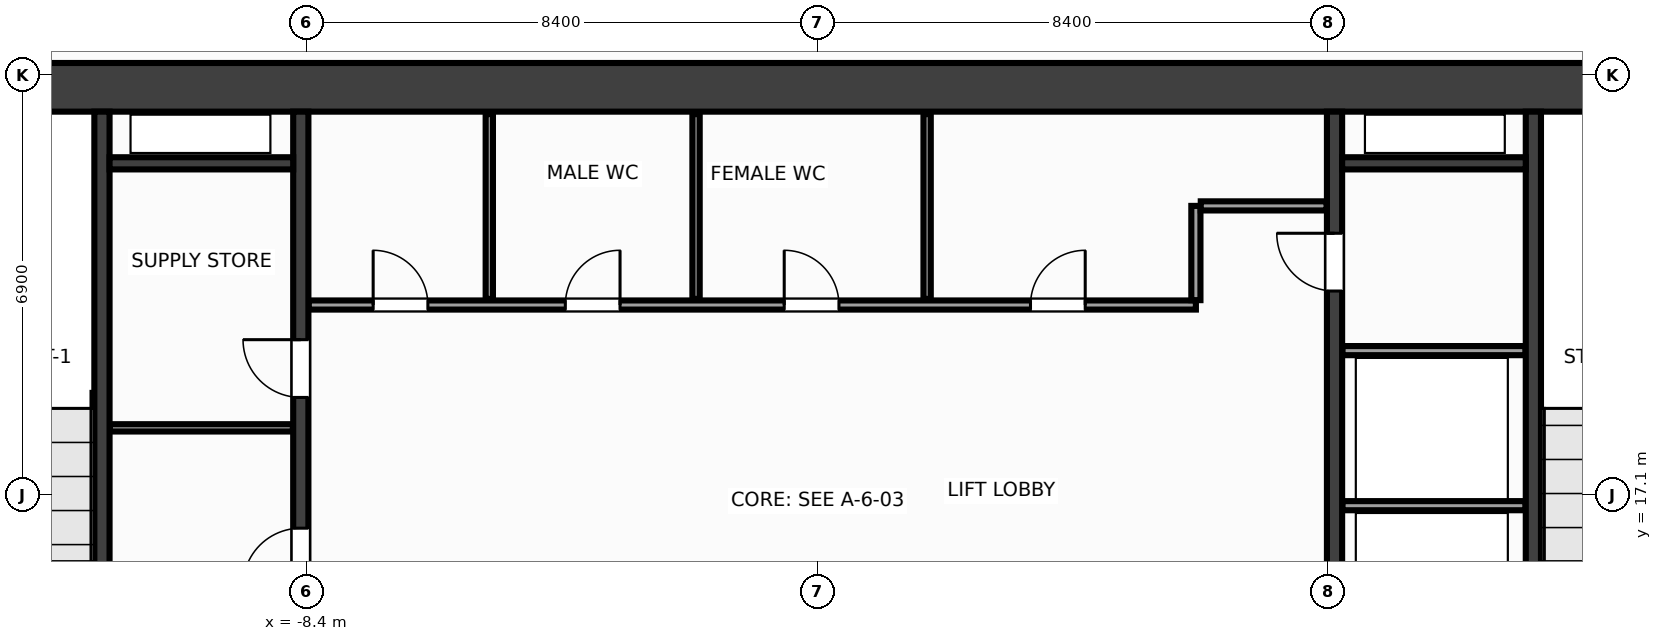
"""IFC4 building model, lengths in metres.
Left out: names, types, materials, properties, quantities, classifications, styles, units other than length and angle.
Written with IfcOpenShell. Run it as: python <this file> out.ifc"""

import sys

from ifc_helpers import new_model, si_unit, direction, frame, frame_2d, origin, place, context, subcontext, project, spatial, rectangle, extrude, source, transform, mapped, element, fill, save


model = new_model("IFC4")
c1 = context("Model", 3, precision=1e-05, world=origin(), true_north=direction((0.0, 1.0)))
c2 = subcontext(c1, "Body", "Model", "MODEL_VIEW")
j1 = project(units=[si_unit("LENGTHUNIT", "METRE"), si_unit("PLANEANGLEUNIT", "RADIAN")], contexts=[c1])
p1 = place(None, origin())
s1 = spatial("IfcSite", under=j1, at=p1, CompositionType="ELEMENT")
p2 = place(p1, origin())
s2 = spatial("IfcBuilding", under=s1, at=p2, CompositionType="ELEMENT")
p3 = place(p2, frame((0.0, 0.0, 41.6)))
s3 = spatial("IfcBuildingStorey", under=s2, at=p3, CompositionType="ELEMENT", Elevation=41.6)
m1 = source(origin(), c2, "Body", "SweptSolid", [
    extrude(rectangle(XDim=32.0, YDim=0.8, at=frame_2d((16.0, 0.0))), origin(), (0.0, 0.0, 1.0), 3.6),
])
p4 = place(p3, frame((-16.0, 23.8, 0.0), z_axis=(0.0, 0.0, 1.0), x_axis=(1.0, 0.0, 0.0)))
e1 = element("IfcWall", 1, at=p4, inside=s3, PredefinedType="SHEAR", context=c2, shape_type="MappedRepresentation", body=[
    mapped(m1, transform((0.0, 0.0, 0.0), x_axis=(1.0, 0.0, 0.0), y_axis=(0.0, 1.0, 0.0), z_axis=(0.0, 0.0, 1.0), scale=1.0)),
])
m2 = source(origin(), c2, "Body", "SweptSolid", [
    extrude(rectangle(XDim=12.8, YDim=0.25, at=frame_2d((6.4, 0.0))), origin(), (0.0, 0.0, 1.0), 3.6),
])
p5 = place(p3, frame((-8.5, 10.6, 0.0), z_axis=(0.0, 0.0, 1.0), x_axis=(0.0, 1.0, 0.0)))
e2 = element("IfcWall", 2, at=p5, inside=s3, PredefinedType="SHEAR", context=c2, shape_type="MappedRepresentation", body=[
    mapped(m2, transform((0.0, 0.0, 0.0), x_axis=(1.0, 0.0, 0.0), y_axis=(0.0, 1.0, 0.0), z_axis=(0.0, 0.0, 1.0), scale=1.0)),
])
p6 = place(p5, frame((5.0, 0.0, 0.0)))
e3 = element("IfcOpeningElement", 3, at=p6, cuts=e2, PredefinedType="OPENING", context=c2, shape_type="SweptSolid", body=[
    extrude(rectangle(XDim=0.95, YDim=2.15, at=frame_2d((0.475, 1.075))), frame((0.0, 0.137, 0.0), z_axis=(0.0, -1.0, 0.0), x_axis=(1.0, 0.0, 0.0)), (0.0, 0.0, 1.0), 0.274),
])
p7 = place(p5, frame((8.1, 0.0, 0.0)))
e4 = element("IfcOpeningElement", 4, at=p7, cuts=e2, PredefinedType="OPENING", context=c2, shape_type="SweptSolid", body=[
    extrude(rectangle(XDim=0.95, YDim=2.15, at=frame_2d((0.475, 1.075))), frame((0.0, 0.137, 0.0), z_axis=(0.0, -1.0, 0.0), x_axis=(1.0, 0.0, 0.0)), (0.0, 0.0, 1.0), 0.274),
])
p8 = place(p3, frame((8.5, 10.6, 0.0), z_axis=(0.0, 0.0, 1.0), x_axis=(0.0, 1.0, 0.0)))
e5 = element("IfcWall", 5, at=p8, inside=s3, PredefinedType="SHEAR", context=c2, shape_type="MappedRepresentation", body=[
    mapped(m2, transform((0.0, 0.0, 0.0), x_axis=(1.0, 0.0, 0.0), y_axis=(0.0, 1.0, 0.0), z_axis=(0.0, 0.0, 1.0), scale=1.0)),
])
p9 = place(p8, frame((9.85, 0.0, 0.0)))
e6 = element("IfcOpeningElement", 6, at=p9, cuts=e5, PredefinedType="OPENING", context=c2, shape_type="SweptSolid", body=[
    extrude(rectangle(XDim=0.95, YDim=2.15, at=frame_2d((0.475, 1.075))), frame((0.0, 0.137, 0.0), z_axis=(0.0, -1.0, 0.0), x_axis=(1.0, 0.0, 0.0)), (0.0, 0.0, 1.0), 0.274),
])
m3 = source(origin(), c2, "Body", "SweptSolid", [
    extrude(rectangle(XDim=9.025, YDim=0.25, at=frame_2d((4.512, 0.0))), origin(), (0.0, 0.0, 1.0), 3.6),
])
for number, where, z_axis, x_axis in (
    (7, (-11.77, 14.375, 0.0), (0.0, 0.0, 1.0), (0.0, 1.0, 0.0)),
    (8, (11.77, 14.375, 0.0), (0.0, 0.0, 1.0), (0.0, 1.0, 0.0)),
):
    element("IfcWall", number, at=place(p3, frame(where, z_axis=z_axis, x_axis=x_axis)), inside=s3, PredefinedType="SHEAR", context=c2, shape_type="MappedRepresentation", body=[
        mapped(m3, transform((0.0, 0.0, 0.0), x_axis=(1.0, 0.0, 0.0), y_axis=(0.0, 1.0, 0.0), z_axis=(0.0, 0.0, 1.0), scale=1.0)),
    ])
m4 = source(origin(), c2, "Body", "SweptSolid", [
    extrude(rectangle(XDim=3.02, YDim=0.2, at=frame_2d((1.51, 0.0))), origin(), (0.0, 0.0, 1.0), 3.6),
])
for number, where, z_axis, x_axis in (
    (9, (-11.645, 22.55, 0.0), (0.0, 0.0, 1.0), (1.0, 0.0, 0.0)),
    (10, (8.625, 22.55, 0.0), (0.0, 0.0, 1.0), (1.0, 0.0, 0.0)),
):
    element("IfcWall", number, at=place(p3, frame(where, z_axis=z_axis, x_axis=x_axis)), inside=s3, PredefinedType="SHEAR", context=c2, shape_type="MappedRepresentation", body=[
        mapped(m4, transform((0.0, 0.0, 0.0), x_axis=(1.0, 0.0, 0.0), y_axis=(0.0, 1.0, 0.0), z_axis=(0.0, 0.0, 1.0), scale=1.0)),
    ])
m5 = source(origin(), c2, "Body", "SweptSolid", [
    extrude(rectangle(XDim=3.01, YDim=0.12, at=frame_2d((1.505, 0.0))), origin(), (0.0, 0.0, 1.0), 3.36),
])
p10 = place(p3, frame((-11.64, 18.2, 0.0), z_axis=(0.0, 0.0, 1.0), x_axis=(1.0, 0.0, 0.0)))
e11 = element("IfcWall", 11, at=p10, inside=s3, PredefinedType="PARTITIONING", context=c2, shape_type="MappedRepresentation", body=[
    mapped(m5, transform((0.0, 0.0, 0.0), x_axis=(1.0, 0.0, 0.0), y_axis=(0.0, 1.0, 0.0), z_axis=(0.0, 0.0, 1.0), scale=1.0)),
])
m6 = source(origin(), c2, "Body", "SweptSolid", [
    extrude(rectangle(XDim=3.01, YDim=0.15, at=frame_2d((1.505, 0.0))), origin(), (0.0, 0.0, 1.0), 3.36),
])
for number, where, z_axis, x_axis in (
    (12, (8.63, 16.92, 0.0), (0.0, 0.0, 1.0), (1.0, 0.0, 0.0)),
    (13, (8.63, 19.47, 0.0), (0.0, 0.0, 1.0), (1.0, 0.0, 0.0)),
):
    element("IfcWall", number, at=place(p3, frame(where, z_axis=z_axis, x_axis=x_axis)), inside=s3, PredefinedType="PARTITIONING", context=c2, shape_type="MappedRepresentation", body=[
        mapped(m6, transform((0.0, 0.0, 0.0), x_axis=(1.0, 0.0, 0.0), y_axis=(0.0, 1.0, 0.0), z_axis=(0.0, 0.0, 1.0), scale=1.0)),
    ])
m7 = source(origin(), c2, "Body", "SweptSolid", [
    extrude(rectangle(XDim=14.59, YDim=0.15, at=frame_2d((7.295, 0.0))), origin(), (0.0, 0.0, 1.0), 3.36),
])
p11 = place(p3, frame((-8.37, 20.22, 0.0), z_axis=(0.0, 0.0, 1.0), x_axis=(1.0, 0.0, 0.0)))
e14 = element("IfcWall", 14, at=p11, inside=s3, PredefinedType="PARTITIONING", context=c2, shape_type="MappedRepresentation", body=[
    mapped(m7, transform((0.0, 0.0, 0.0), x_axis=(1.0, 0.0, 0.0), y_axis=(0.0, 1.0, 0.0), z_axis=(0.0, 0.0, 1.0), scale=1.0)),
])
p12 = place(p11, frame((1.06, 0.0, 0.0)))
e15 = element("IfcOpeningElement", 15, at=p12, cuts=e14, PredefinedType="OPENING", context=c2, shape_type="SweptSolid", body=[
    extrude(rectangle(XDim=0.9, YDim=2.15, at=frame_2d((0.45, 1.075))), frame((0.0, 0.087, 0.0), z_axis=(0.0, -1.0, 0.0), x_axis=(1.0, 0.0, 0.0)), (0.0, 0.0, 1.0), 0.174),
])
p13 = place(p11, frame((4.22, 0.0, 0.0)))
e16 = element("IfcOpeningElement", 16, at=p13, cuts=e14, PredefinedType="OPENING", context=c2, shape_type="SweptSolid", body=[
    extrude(rectangle(XDim=0.9, YDim=2.15, at=frame_2d((0.45, 1.075))), frame((0.0, 0.087, 0.0), z_axis=(0.0, -1.0, 0.0), x_axis=(1.0, 0.0, 0.0)), (0.0, 0.0, 1.0), 0.174),
])
p14 = place(p11, frame((7.82, 0.0, 0.0)))
e17 = element("IfcOpeningElement", 17, at=p14, cuts=e14, PredefinedType="OPENING", context=c2, shape_type="SweptSolid", body=[
    extrude(rectangle(XDim=0.9, YDim=2.15, at=frame_2d((0.45, 1.075))), frame((0.0, 0.087, 0.0), z_axis=(0.0, -1.0, 0.0), x_axis=(1.0, 0.0, 0.0)), (0.0, 0.0, 1.0), 0.174),
])
p15 = place(p11, frame((11.87, 0.0, 0.0)))
e18 = element("IfcOpeningElement", 18, at=p15, cuts=e14, PredefinedType="OPENING", context=c2, shape_type="SweptSolid", body=[
    extrude(rectangle(XDim=0.9, YDim=2.15, at=frame_2d((0.45, 1.075))), frame((0.0, 0.087, 0.0), z_axis=(0.0, -1.0, 0.0), x_axis=(1.0, 0.0, 0.0)), (0.0, 0.0, 1.0), 0.174),
])
m8 = source(origin(), c2, "Body", "SweptSolid", [
    extrude(rectangle(XDim=1.55, YDim=0.15, at=frame_2d((0.775, 0.0))), origin(), (0.0, 0.0, 1.0), 3.36),
])
p16 = place(p3, frame((6.22, 20.3, 0.0), z_axis=(0.0, 0.0, 1.0), x_axis=(0.0, 1.0, 0.0)))
e19 = element("IfcWall", 19, at=p16, inside=s3, PredefinedType="PARTITIONING", context=c2, shape_type="MappedRepresentation", body=[
    mapped(m8, transform((0.0, 0.0, 0.0), x_axis=(1.0, 0.0, 0.0), y_axis=(0.0, 1.0, 0.0), z_axis=(0.0, 0.0, 1.0), scale=1.0)),
])
m9 = source(origin(), c2, "Body", "SweptSolid", [
    extrude(rectangle(XDim=2.07, YDim=0.15, at=frame_2d((1.035, 0.0))), origin(), (0.0, 0.0, 1.0), 3.36),
])
p17 = place(p3, frame((6.3, 21.85, 0.0), z_axis=(0.0, 0.0, 1.0), x_axis=(1.0, 0.0, 0.0)))
e20 = element("IfcWall", 20, at=p17, inside=s3, PredefinedType="PARTITIONING", context=c2, shape_type="MappedRepresentation", body=[
    mapped(m9, transform((0.0, 0.0, 0.0), x_axis=(1.0, 0.0, 0.0), y_axis=(0.0, 1.0, 0.0), z_axis=(0.0, 0.0, 1.0), scale=1.0)),
])
m10 = source(origin(), c2, "Body", "SweptSolid", [
    extrude(rectangle(XDim=3.04, YDim=0.12, at=frame_2d((1.52, 0.0))), origin(), (0.0, 0.0, 1.0), 3.36),
])
for number, where, z_axis, x_axis in (
    (21, (-5.4, 20.32, 0.0), (0.0, 0.0, 1.0), (0.0, 1.0, 0.0)),
    (22, (-2.0, 20.32, 0.0), (0.0, 0.0, 1.0), (0.0, 1.0, 0.0)),
    (23, (1.8, 20.32, 0.0), (0.0, 0.0, 1.0), (0.0, 1.0, 0.0)),
):
    element("IfcWall", number, at=place(p3, frame(where, z_axis=z_axis, x_axis=x_axis)), inside=s3, PredefinedType="PARTITIONING", context=c2, shape_type="MappedRepresentation", body=[
        mapped(m10, transform((0.0, 0.0, 0.0), x_axis=(1.0, 0.0, 0.0), y_axis=(0.0, 1.0, 0.0), z_axis=(0.0, 0.0, 1.0), scale=1.0)),
    ])
m11 = source(origin(), c2, "Body", "SweptSolid", [
    extrude(rectangle(XDim=0.95, YDim=2.15, at=frame_2d((0.475, 1.075))), frame((0.0, 0.025, 0.0), z_axis=(0.0, -1.0, 0.0), x_axis=(1.0, 0.0, 0.0)), (0.0, 0.0, 1.0), 0.05),
])
p18 = place(p6, origin())
e24 = element("IfcDoor", 24, at=p18, inside=s3, OperationType="SINGLE_SWING_LEFT", PredefinedType="DOOR", context=c2, shape_type="MappedRepresentation", body=[
    mapped(m11, transform((0.0, 0.0, 0.0), x_axis=(1.0, 0.0, 0.0), y_axis=(0.0, 1.0, 0.0), z_axis=(0.0, 0.0, 1.0), scale=1.0)),
])
fill(e3, e24)
p19 = place(p7, origin())
e25 = element("IfcDoor", 25, at=p19, inside=s3, OperationType="SINGLE_SWING_RIGHT", PredefinedType="DOOR", context=c2, shape_type="MappedRepresentation", body=[
    mapped(m11, transform((0.0, 0.0, 0.0), x_axis=(1.0, 0.0, 0.0), y_axis=(0.0, 1.0, 0.0), z_axis=(0.0, 0.0, 1.0), scale=1.0)),
])
fill(e4, e25)
m12 = source(origin(), c2, "Body", "SweptSolid", [
    extrude(rectangle(XDim=0.95, YDim=2.15, at=frame_2d((0.475, 1.075))), frame((0.0, 0.025, 0.0), z_axis=(0.0, -1.0, 0.0), x_axis=(1.0, 0.0, 0.0)), (0.0, 0.0, 1.0), 0.05),
])
p20 = place(p9, origin())
e26 = element("IfcDoor", 26, at=p20, inside=s3, OperationType="SINGLE_SWING_RIGHT", PredefinedType="DOOR", context=c2, shape_type="MappedRepresentation", body=[
    mapped(m12, transform((0.0, 0.0, 0.0), x_axis=(1.0, 0.0, 0.0), y_axis=(0.0, 1.0, 0.0), z_axis=(0.0, 0.0, 1.0), scale=1.0)),
])
fill(e6, e26)
m13 = source(origin(), c2, "Body", "SweptSolid", [
    extrude(rectangle(XDim=0.9, YDim=2.15, at=frame_2d((0.45, 1.075))), frame((0.0, 0.025, 0.0), z_axis=(0.0, -1.0, 0.0), x_axis=(1.0, 0.0, 0.0)), (0.0, 0.0, 1.0), 0.05),
])
p21 = place(p12, origin())
e27 = element("IfcDoor", 27, at=p21, inside=s3, OperationType="SINGLE_SWING_LEFT", PredefinedType="DOOR", context=c2, shape_type="MappedRepresentation", body=[
    mapped(m13, transform((0.0, 0.0, 0.0), x_axis=(1.0, 0.0, 0.0), y_axis=(0.0, 1.0, 0.0), z_axis=(0.0, 0.0, 1.0), scale=1.0)),
])
fill(e15, e27)
p22 = place(p13, origin())
e28 = element("IfcDoor", 28, at=p22, inside=s3, OperationType="SINGLE_SWING_RIGHT", PredefinedType="DOOR", context=c2, shape_type="MappedRepresentation", body=[
    mapped(m13, transform((0.0, 0.0, 0.0), x_axis=(1.0, 0.0, 0.0), y_axis=(0.0, 1.0, 0.0), z_axis=(0.0, 0.0, 1.0), scale=1.0)),
])
fill(e16, e28)
p23 = place(p14, origin())
e29 = element("IfcDoor", 29, at=p23, inside=s3, OperationType="SINGLE_SWING_LEFT", PredefinedType="DOOR", context=c2, shape_type="MappedRepresentation", body=[
    mapped(m13, transform((0.0, 0.0, 0.0), x_axis=(1.0, 0.0, 0.0), y_axis=(0.0, 1.0, 0.0), z_axis=(0.0, 0.0, 1.0), scale=1.0)),
])
fill(e17, e29)
p24 = place(p15, origin())
e30 = element("IfcDoor", 30, at=p24, inside=s3, OperationType="SINGLE_SWING_RIGHT", PredefinedType="DOOR", context=c2, shape_type="MappedRepresentation", body=[
    mapped(m13, transform((0.0, 0.0, 0.0), x_axis=(1.0, 0.0, 0.0), y_axis=(0.0, 1.0, 0.0), z_axis=(0.0, 0.0, 1.0), scale=1.0)),
])
fill(e18, e30)
save(model, sys.argv[1])
